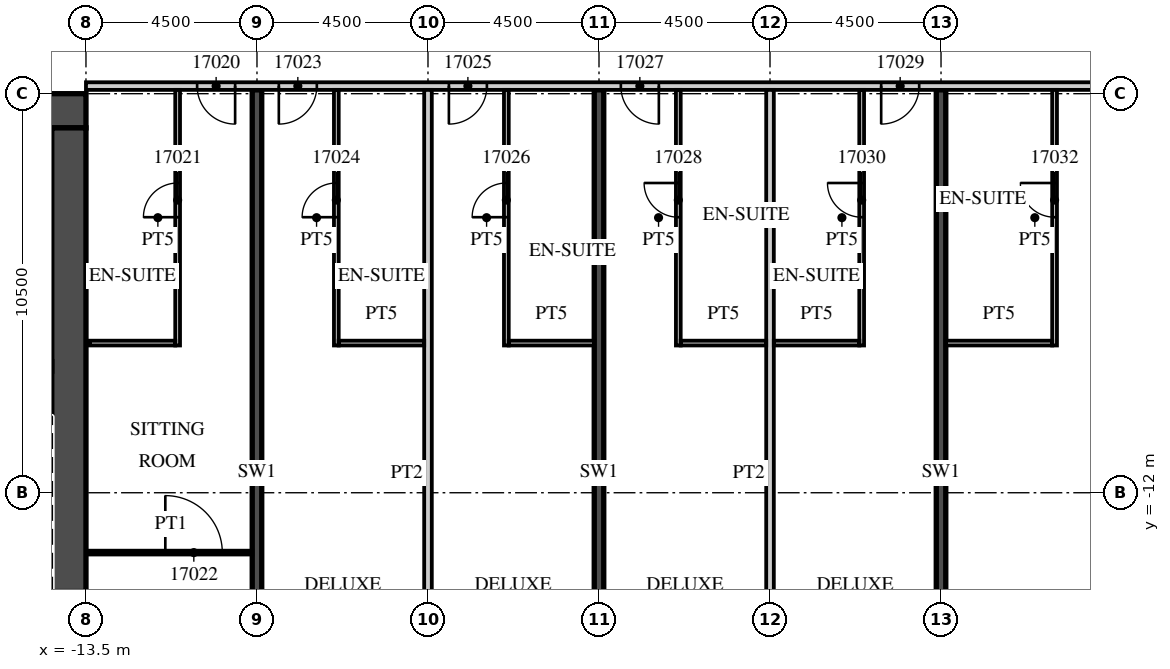
"""IFC4 building model, lengths in metres.
Left out: names, types, materials, properties, quantities, classifications, styles, units other than length and angle.
Written with IfcOpenShell. Run it as: python <this file> out.ifc"""

import sys

from ifc_helpers import new_model, si_unit, direction, frame, frame_2d, origin, place, context, subcontext, project, spatial, rectangle, extrude, element, fill, save


model = new_model("IFC4")
c1 = context("Model", 3, precision=1e-05, world=origin(), true_north=direction((0.0, 1.0)))
c2 = subcontext(c1, "Body", "Model", "MODEL_VIEW")
j1 = project(units=[si_unit("LENGTHUNIT", "METRE"), si_unit("PLANEANGLEUNIT", "RADIAN")], contexts=[c1])
p1 = place(None, origin())
s1 = spatial("IfcSite", under=j1, at=p1, CompositionType="ELEMENT")
p2 = place(p1, origin())
s2 = spatial("IfcBuilding", under=s1, at=p2, CompositionType="ELEMENT")
p3 = place(p2, frame((0.0, 0.0, 86.4)))
s3 = spatial("IfcBuildingStorey", under=s2, at=p3, CompositionType="ELEMENT", Elevation=86.4)
for number, where, z_axis, x_axis in (
    (1, (-9.0, -21.54, 0.0), (0.0, 0.0, 1.0), (0.0, 1.0, 0.0)),
    (2, (0.0, -21.54, 0.0), (0.0, 0.0, 1.0), (0.0, 1.0, 0.0)),
    (3, (9.0, -21.54, 0.0), (0.0, 0.0, 1.0), (0.0, 1.0, 0.0)),
):
    element("IfcWall", number, at=place(p3, frame(where, z_axis=z_axis, x_axis=x_axis)), inside=s3, PredefinedType="SHEAR", context=c2, shape_type="SweptSolid", body=[
        extrude(rectangle(XDim=20.14, YDim=0.25, at=frame_2d((10.07, 0.0))), origin(), (0.0, 0.0, 1.0), 3.3),
    ])
p4 = place(p3, frame((-13.5, -1.3, 0.0), z_axis=(0.0, 0.0, 1.0), x_axis=(1.0, 0.0, 0.0)))
e4 = element("IfcWall", 4, at=p4, inside=s3, PredefinedType="PARTITIONING", context=c2, shape_type="SweptSolid", body=[
    extrude(rectangle(XDim=58.05, YDim=0.2, at=frame_2d((29.025, 0.0))), origin(), (0.0, 0.0, 1.0), 3.02),
])
p5 = place(p4, frame((2.925, 0.0, 0.0)))
e5 = element("IfcOpeningElement", 5, at=p5, cuts=e4, PredefinedType="OPENING", context=c2, shape_type="SweptSolid", body=[
    extrude(rectangle(XDim=1.0, YDim=2.1, at=frame_2d((0.5, 1.05))), frame((0.0, 0.11, 0.0), z_axis=(0.0, -1.0, 0.0), x_axis=(1.0, 0.0, 0.0)), (0.0, 0.0, 1.0), 0.22),
])
p6 = place(p4, frame((5.075, 0.0, 0.0)))
e6 = element("IfcOpeningElement", 6, at=p6, cuts=e4, PredefinedType="OPENING", context=c2, shape_type="SweptSolid", body=[
    extrude(rectangle(XDim=1.0, YDim=2.1, at=frame_2d((0.5, 1.05))), frame((0.0, 0.11, 0.0), z_axis=(0.0, -1.0, 0.0), x_axis=(1.0, 0.0, 0.0)), (0.0, 0.0, 1.0), 0.22),
])
p7 = place(p4, frame((9.55, 0.0, 0.0)))
e7 = element("IfcOpeningElement", 7, at=p7, cuts=e4, PredefinedType="OPENING", context=c2, shape_type="SweptSolid", body=[
    extrude(rectangle(XDim=1.0, YDim=2.1, at=frame_2d((0.5, 1.05))), frame((0.0, 0.11, 0.0), z_axis=(0.0, -1.0, 0.0), x_axis=(1.0, 0.0, 0.0)), (0.0, 0.0, 1.0), 0.22),
])
p8 = place(p4, frame((14.075, 0.0, 0.0)))
e8 = element("IfcOpeningElement", 8, at=p8, cuts=e4, PredefinedType="OPENING", context=c2, shape_type="SweptSolid", body=[
    extrude(rectangle(XDim=1.0, YDim=2.1, at=frame_2d((0.5, 1.05))), frame((0.0, 0.11, 0.0), z_axis=(0.0, -1.0, 0.0), x_axis=(1.0, 0.0, 0.0)), (0.0, 0.0, 1.0), 0.22),
])
p9 = place(p4, frame((20.925, 0.0, 0.0)))
e9 = element("IfcOpeningElement", 9, at=p9, cuts=e4, PredefinedType="OPENING", context=c2, shape_type="SweptSolid", body=[
    extrude(rectangle(XDim=1.0, YDim=2.1, at=frame_2d((0.5, 1.05))), frame((0.0, 0.11, 0.0), z_axis=(0.0, -1.0, 0.0), x_axis=(1.0, 0.0, 0.0)), (0.0, 0.0, 1.0), 0.22),
])
p10 = place(p4, frame((27.862, 0.0, 0.0)))
e10 = element("IfcOpeningElement", 10, at=p10, cuts=e4, PredefinedType="OPENING", context=c2, shape_type="SweptSolid", body=[
    extrude(rectangle(XDim=1.2, YDim=2.1, at=frame_2d((0.6, 1.05))), frame((0.0, 0.11, 0.0), z_axis=(0.0, -1.0, 0.0), x_axis=(1.0, 0.0, 0.0)), (0.0, 0.0, 1.0), 0.22),
])
p11 = place(p4, frame((34.45, 0.0, 0.0)))
e11 = element("IfcOpeningElement", 11, at=p11, cuts=e4, PredefinedType="OPENING", context=c2, shape_type="SweptSolid", body=[
    extrude(rectangle(XDim=1.0, YDim=2.1, at=frame_2d((0.5, 1.05))), frame((0.0, 0.11, 0.0), z_axis=(0.0, -1.0, 0.0), x_axis=(1.0, 0.0, 0.0)), (0.0, 0.0, 1.0), 0.22),
])
p12 = place(p4, frame((38.925, 0.0, 0.0)))
e12 = element("IfcOpeningElement", 12, at=p12, cuts=e4, PredefinedType="OPENING", context=c2, shape_type="SweptSolid", body=[
    extrude(rectangle(XDim=1.0, YDim=2.1, at=frame_2d((0.5, 1.05))), frame((0.0, 0.11, 0.0), z_axis=(0.0, -1.0, 0.0), x_axis=(1.0, 0.0, 0.0)), (0.0, 0.0, 1.0), 0.22),
])
p13 = place(p4, frame((41.075, 0.0, 0.0)))
e13 = element("IfcOpeningElement", 13, at=p13, cuts=e4, PredefinedType="OPENING", context=c2, shape_type="SweptSolid", body=[
    extrude(rectangle(XDim=1.0, YDim=2.1, at=frame_2d((0.5, 1.05))), frame((0.0, 0.11, 0.0), z_axis=(0.0, -1.0, 0.0), x_axis=(1.0, 0.0, 0.0)), (0.0, 0.0, 1.0), 0.22),
])
p14 = place(p4, frame((45.55, 0.0, 0.0)))
e14 = element("IfcOpeningElement", 14, at=p14, cuts=e4, PredefinedType="OPENING", context=c2, shape_type="SweptSolid", body=[
    extrude(rectangle(XDim=1.0, YDim=2.1, at=frame_2d((0.5, 1.05))), frame((0.0, 0.11, 0.0), z_axis=(0.0, -1.0, 0.0), x_axis=(1.0, 0.0, 0.0)), (0.0, 0.0, 1.0), 0.22),
])
p15 = place(p4, frame((50.075, 0.0, 0.0)))
e15 = element("IfcOpeningElement", 15, at=p15, cuts=e4, PredefinedType="OPENING", context=c2, shape_type="SweptSolid", body=[
    extrude(rectangle(XDim=1.0, YDim=2.1, at=frame_2d((0.5, 1.05))), frame((0.0, 0.11, 0.0), z_axis=(0.0, -1.0, 0.0), x_axis=(1.0, 0.0, 0.0)), (0.0, 0.0, 1.0), 0.22),
])
p16 = place(p4, frame((56.525, 0.0, 0.0)))
e16 = element("IfcOpeningElement", 16, at=p16, cuts=e4, PredefinedType="OPENING", context=c2, shape_type="SweptSolid", body=[
    extrude(rectangle(XDim=1.0, YDim=2.1, at=frame_2d((0.5, 1.05))), frame((0.0, 0.11, 0.0), z_axis=(0.0, -1.0, 0.0), x_axis=(1.0, 0.0, 0.0)), (0.0, 0.0, 1.0), 0.22),
])
p17 = place(p3, frame((-11.088, -8.125, 0.0), z_axis=(0.0, 0.0, 1.0), x_axis=(0.0, 1.0, 0.0)))
e17 = element("IfcWall", 17, at=p17, inside=s3, PredefinedType="PARTITIONING", context=c2, shape_type="SweptSolid", body=[
    extrude(rectangle(XDim=6.725, YDim=0.125, at=frame_2d((3.363, 0.0))), origin(), (0.0, 0.0, 1.0), 3.02),
])
p18 = place(p17, frame((3.375, 0.0, 0.0)))
e18 = element("IfcOpeningElement", 18, at=p18, cuts=e17, PredefinedType="OPENING", context=c2, shape_type="SweptSolid", body=[
    extrude(rectangle(XDim=0.9, YDim=2.1, at=frame_2d((0.45, 1.05))), frame((0.0, 0.073, 0.0), z_axis=(0.0, -1.0, 0.0), x_axis=(1.0, 0.0, 0.0)), (0.0, 0.0, 1.0), 0.145),
])
p19 = place(p3, frame((-13.4, -8.062, 0.0), z_axis=(0.0, 0.0, 1.0), x_axis=(1.0, 0.0, 0.0)))
e19 = element("IfcWall", 19, at=p19, inside=s3, PredefinedType="PARTITIONING", context=c2, shape_type="SweptSolid", body=[
    extrude(rectangle(XDim=2.25, YDim=0.125, at=frame_2d((1.125, 0.0))), origin(), (0.0, 0.0, 1.0), 3.02),
])
p20 = place(p3, frame((-13.4, -13.575, 0.0), z_axis=(0.0, 0.0, 1.0), x_axis=(1.0, 0.0, 0.0)))
e20 = element("IfcWall", 20, at=p20, inside=s3, PredefinedType="PARTITIONING", context=c2, shape_type="SweptSolid", body=[
    extrude(rectangle(XDim=4.275, YDim=0.1, at=frame_2d((2.137, 0.0))), origin(), (0.0, 0.0, 1.0), 3.02),
])
p21 = place(p20, frame((1.988, 0.0, 0.0)))
e21 = element("IfcOpeningElement", 21, at=p21, cuts=e20, PredefinedType="OPENING", context=c2, shape_type="SweptSolid", body=[
    extrude(rectangle(XDim=1.5, YDim=2.1, at=frame_2d((0.75, 1.05))), frame((0.0, 0.06, 0.0), z_axis=(0.0, -1.0, 0.0), x_axis=(1.0, 0.0, 0.0)), (0.0, 0.0, 1.0), 0.12),
])
p22 = place(p3, frame((-4.5, -21.55, 0.0), z_axis=(0.0, 0.0, 1.0), x_axis=(0.0, 1.0, 0.0)))
e22 = element("IfcWall", 22, at=p22, inside=s3, PredefinedType="PARTITIONING", context=c2, shape_type="SweptSolid", body=[
    extrude(rectangle(XDim=20.15, YDim=0.2, at=frame_2d((10.075, 0.0))), origin(), (0.0, 0.0, 1.0), 3.02),
])
p23 = place(p3, frame((-6.912, -8.125, 0.0), z_axis=(0.0, 0.0, 1.0), x_axis=(0.0, 1.0, 0.0)))
e23 = element("IfcWall", 23, at=p23, inside=s3, PredefinedType="PARTITIONING", context=c2, shape_type="SweptSolid", body=[
    extrude(rectangle(XDim=6.725, YDim=0.125, at=frame_2d((3.363, 0.0))), origin(), (0.0, 0.0, 1.0), 3.02),
])
p24 = place(p23, frame((3.375, 0.0, 0.0)))
e24 = element("IfcOpeningElement", 24, at=p24, cuts=e23, PredefinedType="OPENING", context=c2, shape_type="SweptSolid", body=[
    extrude(rectangle(XDim=0.9, YDim=2.1, at=frame_2d((0.45, 1.05))), frame((0.0, 0.073, 0.0), z_axis=(0.0, -1.0, 0.0), x_axis=(1.0, 0.0, 0.0)), (0.0, 0.0, 1.0), 0.145),
])
p25 = place(p3, frame((-6.85, -8.062, 0.0), z_axis=(0.0, 0.0, 1.0), x_axis=(1.0, 0.0, 0.0)))
e25 = element("IfcWall", 25, at=p25, inside=s3, PredefinedType="PARTITIONING", context=c2, shape_type="SweptSolid", body=[
    extrude(rectangle(XDim=2.25, YDim=0.125, at=frame_2d((1.125, 0.0))), origin(), (0.0, 0.0, 1.0), 3.02),
])
p26 = place(p3, frame((-2.438, -8.125, 0.0), z_axis=(0.0, 0.0, 1.0), x_axis=(0.0, 1.0, 0.0)))
e26 = element("IfcWall", 26, at=p26, inside=s3, PredefinedType="PARTITIONING", context=c2, shape_type="SweptSolid", body=[
    extrude(rectangle(XDim=6.725, YDim=0.125, at=frame_2d((3.363, 0.0))), origin(), (0.0, 0.0, 1.0), 3.02),
])
p27 = place(p26, frame((3.375, 0.0, 0.0)))
e27 = element("IfcOpeningElement", 27, at=p27, cuts=e26, PredefinedType="OPENING", context=c2, shape_type="SweptSolid", body=[
    extrude(rectangle(XDim=0.9, YDim=2.1, at=frame_2d((0.45, 1.05))), frame((0.0, 0.073, 0.0), z_axis=(0.0, -1.0, 0.0), x_axis=(1.0, 0.0, 0.0)), (0.0, 0.0, 1.0), 0.145),
])
p28 = place(p3, frame((-2.375, -8.062, 0.0), z_axis=(0.0, 0.0, 1.0), x_axis=(1.0, 0.0, 0.0)))
e28 = element("IfcWall", 28, at=p28, inside=s3, PredefinedType="PARTITIONING", context=c2, shape_type="SweptSolid", body=[
    extrude(rectangle(XDim=2.25, YDim=0.125, at=frame_2d((1.125, 0.0))), origin(), (0.0, 0.0, 1.0), 3.02),
])
p29 = place(p3, frame((4.5, -21.55, 0.0), z_axis=(0.0, 0.0, 1.0), x_axis=(0.0, 1.0, 0.0)))
e29 = element("IfcWall", 29, at=p29, inside=s3, PredefinedType="PARTITIONING", context=c2, shape_type="SweptSolid", body=[
    extrude(rectangle(XDim=20.15, YDim=0.2, at=frame_2d((10.075, 0.0))), origin(), (0.0, 0.0, 1.0), 3.02),
])
p30 = place(p3, frame((2.087, -8.125, 0.0), z_axis=(0.0, 0.0, 1.0), x_axis=(0.0, 1.0, 0.0)))
e30 = element("IfcWall", 30, at=p30, inside=s3, PredefinedType="PARTITIONING", context=c2, shape_type="SweptSolid", body=[
    extrude(rectangle(XDim=6.725, YDim=0.125, at=frame_2d((3.363, 0.0))), origin(), (0.0, 0.0, 1.0), 3.02),
])
p31 = place(p30, frame((3.375, 0.0, 0.0)))
e31 = element("IfcOpeningElement", 31, at=p31, cuts=e30, PredefinedType="OPENING", context=c2, shape_type="SweptSolid", body=[
    extrude(rectangle(XDim=0.9, YDim=2.1, at=frame_2d((0.45, 1.05))), frame((0.0, 0.073, 0.0), z_axis=(0.0, -1.0, 0.0), x_axis=(1.0, 0.0, 0.0)), (0.0, 0.0, 1.0), 0.145),
])
p32 = place(p3, frame((2.15, -8.062, 0.0), z_axis=(0.0, 0.0, 1.0), x_axis=(1.0, 0.0, 0.0)))
e32 = element("IfcWall", 32, at=p32, inside=s3, PredefinedType="PARTITIONING", context=c2, shape_type="SweptSolid", body=[
    extrude(rectangle(XDim=2.25, YDim=0.125, at=frame_2d((1.125, 0.0))), origin(), (0.0, 0.0, 1.0), 3.02),
])
p33 = place(p3, frame((6.912, -8.125, 0.0), z_axis=(0.0, 0.0, 1.0), x_axis=(0.0, 1.0, 0.0)))
e33 = element("IfcWall", 33, at=p33, inside=s3, PredefinedType="PARTITIONING", context=c2, shape_type="SweptSolid", body=[
    extrude(rectangle(XDim=6.725, YDim=0.125, at=frame_2d((3.363, 0.0))), origin(), (0.0, 0.0, 1.0), 3.02),
])
p34 = place(p33, frame((3.375, 0.0, 0.0)))
e34 = element("IfcOpeningElement", 34, at=p34, cuts=e33, PredefinedType="OPENING", context=c2, shape_type="SweptSolid", body=[
    extrude(rectangle(XDim=0.9, YDim=2.1, at=frame_2d((0.45, 1.05))), frame((0.0, 0.073, 0.0), z_axis=(0.0, -1.0, 0.0), x_axis=(1.0, 0.0, 0.0)), (0.0, 0.0, 1.0), 0.145),
])
p35 = place(p3, frame((4.6, -8.062, 0.0), z_axis=(0.0, 0.0, 1.0), x_axis=(1.0, 0.0, 0.0)))
e35 = element("IfcWall", 35, at=p35, inside=s3, PredefinedType="PARTITIONING", context=c2, shape_type="SweptSolid", body=[
    extrude(rectangle(XDim=2.25, YDim=0.125, at=frame_2d((1.125, 0.0))), origin(), (0.0, 0.0, 1.0), 3.02),
])
p36 = place(p3, frame((11.988, -8.125, 0.0), z_axis=(0.0, 0.0, 1.0), x_axis=(0.0, 1.0, 0.0)))
e36 = element("IfcWall", 36, at=p36, inside=s3, PredefinedType="PARTITIONING", context=c2, shape_type="SweptSolid", body=[
    extrude(rectangle(XDim=6.725, YDim=0.125, at=frame_2d((3.363, 0.0))), origin(), (0.0, 0.0, 1.0), 3.02),
])
p37 = place(p36, frame((3.375, 0.0, 0.0)))
e37 = element("IfcOpeningElement", 37, at=p37, cuts=e36, PredefinedType="OPENING", context=c2, shape_type="SweptSolid", body=[
    extrude(rectangle(XDim=0.9, YDim=2.1, at=frame_2d((0.45, 1.05))), frame((0.0, 0.073, 0.0), z_axis=(0.0, -1.0, 0.0), x_axis=(1.0, 0.0, 0.0)), (0.0, 0.0, 1.0), 0.145),
])
p38 = place(p3, frame((9.125, -8.062, 0.0), z_axis=(0.0, 0.0, 1.0), x_axis=(1.0, 0.0, 0.0)))
e38 = element("IfcWall", 38, at=p38, inside=s3, PredefinedType="PARTITIONING", context=c2, shape_type="SweptSolid", body=[
    extrude(rectangle(XDim=2.8, YDim=0.125, at=frame_2d((1.4, 0.0))), origin(), (0.0, 0.0, 1.0), 3.02),
])
p39 = place(p3, frame((-31.5, -1.95, 0.0), z_axis=(0.0, 0.0, 1.0), x_axis=(1.0, 0.0, 0.0)))
e39 = element("IfcWall", 39, at=p39, inside=s3, PredefinedType="SHEAR", context=c2, shape_type="SweptSolid", body=[
    extrude(rectangle(XDim=18.0, YDim=0.9, at=frame_2d((9.0, 0.0))), origin(), (0.0, 0.0, 1.0), 3.02),
])
p40 = place(p39, frame((14.725, 0.0, 0.0)))
e40 = element("IfcOpeningElement", 40, at=p40, cuts=e39, PredefinedType="OPENING", context=c2, shape_type="SweptSolid", body=[
    extrude(rectangle(XDim=1.8, YDim=2.1, at=frame_2d((0.9, 1.05))), frame((0.0, 0.46, 0.0), z_axis=(0.0, -1.0, 0.0), x_axis=(1.0, 0.0, 0.0)), (0.0, 0.0, 1.0), 0.92),
])
p41 = place(p3, frame((-13.95, -14.6, 0.0), z_axis=(0.0, 0.0, 1.0), x_axis=(0.0, 1.0, 0.0)))
e41 = element("IfcWall", 41, at=p41, inside=s3, PredefinedType="SHEAR", context=c2, shape_type="SweptSolid", body=[
    extrude(rectangle(XDim=12.2, YDim=0.9, at=frame_2d((6.1, 0.0))), origin(), (0.0, 0.0, 1.0), 3.02),
])
p42 = place(p5, origin())
e42 = element("IfcDoor", 42, at=p42, inside=s3, OperationType="SINGLE_SWING_RIGHT", PredefinedType="DOOR", context=c2, shape_type="SweptSolid", body=[
    extrude(rectangle(XDim=1.0, YDim=2.1, at=frame_2d((0.5, 1.05))), frame((0.0, 0.025, 0.0), z_axis=(0.0, -1.0, 0.0), x_axis=(1.0, 0.0, 0.0)), (0.0, 0.0, 1.0), 0.05),
])
fill(e5, e42)
p43 = place(p18, origin())
e43 = element("IfcDoor", 43, at=p43, inside=s3, OperationType="SINGLE_SWING_LEFT", PredefinedType="DOOR", context=c2, shape_type="SweptSolid", body=[
    extrude(rectangle(XDim=0.9, YDim=2.1, at=frame_2d((0.45, 1.05))), frame((0.0, 0.025, 0.0), z_axis=(0.0, -1.0, 0.0), x_axis=(1.0, 0.0, 0.0)), (0.0, 0.0, 1.0), 0.05),
])
fill(e18, e43)
p44 = place(p21, origin())
e44 = element("IfcDoor", 44, at=p44, inside=s3, OperationType="SINGLE_SWING_LEFT", PredefinedType="DOOR", context=c2, shape_type="SweptSolid", body=[
    extrude(rectangle(XDim=1.5, YDim=2.1, at=frame_2d((0.75, 1.05))), frame((0.0, 0.025, 0.0), z_axis=(0.0, -1.0, 0.0), x_axis=(1.0, 0.0, 0.0)), (0.0, 0.0, 1.0), 0.05),
])
fill(e21, e44)
p45 = place(p6, origin())
e45 = element("IfcDoor", 45, at=p45, inside=s3, OperationType="SINGLE_SWING_LEFT", PredefinedType="DOOR", context=c2, shape_type="SweptSolid", body=[
    extrude(rectangle(XDim=1.0, YDim=2.1, at=frame_2d((0.5, 1.05))), frame((0.0, 0.025, 0.0), z_axis=(0.0, -1.0, 0.0), x_axis=(1.0, 0.0, 0.0)), (0.0, 0.0, 1.0), 0.05),
])
fill(e6, e45)
p46 = place(p24, origin())
e46 = element("IfcDoor", 46, at=p46, inside=s3, OperationType="SINGLE_SWING_LEFT", PredefinedType="DOOR", context=c2, shape_type="SweptSolid", body=[
    extrude(rectangle(XDim=0.9, YDim=2.1, at=frame_2d((0.45, 1.05))), frame((0.0, 0.025, 0.0), z_axis=(0.0, -1.0, 0.0), x_axis=(1.0, 0.0, 0.0)), (0.0, 0.0, 1.0), 0.05),
])
fill(e24, e46)
p47 = place(p7, origin())
e47 = element("IfcDoor", 47, at=p47, inside=s3, OperationType="SINGLE_SWING_LEFT", PredefinedType="DOOR", context=c2, shape_type="SweptSolid", body=[
    extrude(rectangle(XDim=1.0, YDim=2.1, at=frame_2d((0.5, 1.05))), frame((0.0, 0.025, 0.0), z_axis=(0.0, -1.0, 0.0), x_axis=(1.0, 0.0, 0.0)), (0.0, 0.0, 1.0), 0.05),
])
fill(e7, e47)
p48 = place(p27, origin())
e48 = element("IfcDoor", 48, at=p48, inside=s3, OperationType="SINGLE_SWING_LEFT", PredefinedType="DOOR", context=c2, shape_type="SweptSolid", body=[
    extrude(rectangle(XDim=0.9, YDim=2.1, at=frame_2d((0.45, 1.05))), frame((0.0, 0.025, 0.0), z_axis=(0.0, -1.0, 0.0), x_axis=(1.0, 0.0, 0.0)), (0.0, 0.0, 1.0), 0.05),
])
fill(e27, e48)
p49 = place(p8, origin())
e49 = element("IfcDoor", 49, at=p49, inside=s3, OperationType="SINGLE_SWING_RIGHT", PredefinedType="DOOR", context=c2, shape_type="SweptSolid", body=[
    extrude(rectangle(XDim=1.0, YDim=2.1, at=frame_2d((0.5, 1.05))), frame((0.0, 0.025, 0.0), z_axis=(0.0, -1.0, 0.0), x_axis=(1.0, 0.0, 0.0)), (0.0, 0.0, 1.0), 0.05),
])
fill(e8, e49)
p50 = place(p31, origin())
e50 = element("IfcDoor", 50, at=p50, inside=s3, OperationType="SINGLE_SWING_RIGHT", PredefinedType="DOOR", context=c2, shape_type="SweptSolid", body=[
    extrude(rectangle(XDim=0.9, YDim=2.1, at=frame_2d((0.45, 1.05))), frame((0.0, 0.025, 0.0), z_axis=(0.0, -1.0, 0.0), x_axis=(1.0, 0.0, 0.0)), (0.0, 0.0, 1.0), 0.05),
])
fill(e31, e50)
p51 = place(p9, origin())
e51 = element("IfcDoor", 51, at=p51, inside=s3, OperationType="SINGLE_SWING_LEFT", PredefinedType="DOOR", context=c2, shape_type="SweptSolid", body=[
    extrude(rectangle(XDim=1.0, YDim=2.1, at=frame_2d((0.5, 1.05))), frame((0.0, 0.025, 0.0), z_axis=(0.0, -1.0, 0.0), x_axis=(1.0, 0.0, 0.0)), (0.0, 0.0, 1.0), 0.05),
])
fill(e9, e51)
p52 = place(p34, origin())
e52 = element("IfcDoor", 52, at=p52, inside=s3, OperationType="SINGLE_SWING_RIGHT", PredefinedType="DOOR", context=c2, shape_type="SweptSolid", body=[
    extrude(rectangle(XDim=0.9, YDim=2.1, at=frame_2d((0.45, 1.05))), frame((0.0, 0.025, 0.0), z_axis=(0.0, -1.0, 0.0), x_axis=(1.0, 0.0, 0.0)), (0.0, 0.0, 1.0), 0.05),
])
fill(e34, e52)
p53 = place(p37, origin())
e53 = element("IfcDoor", 53, at=p53, inside=s3, OperationType="SINGLE_SWING_RIGHT", PredefinedType="DOOR", context=c2, shape_type="SweptSolid", body=[
    extrude(rectangle(XDim=0.9, YDim=2.1, at=frame_2d((0.45, 1.05))), frame((0.0, 0.025, 0.0), z_axis=(0.0, -1.0, 0.0), x_axis=(1.0, 0.0, 0.0)), (0.0, 0.0, 1.0), 0.05),
])
fill(e37, e53)
save(model, sys.argv[1])
